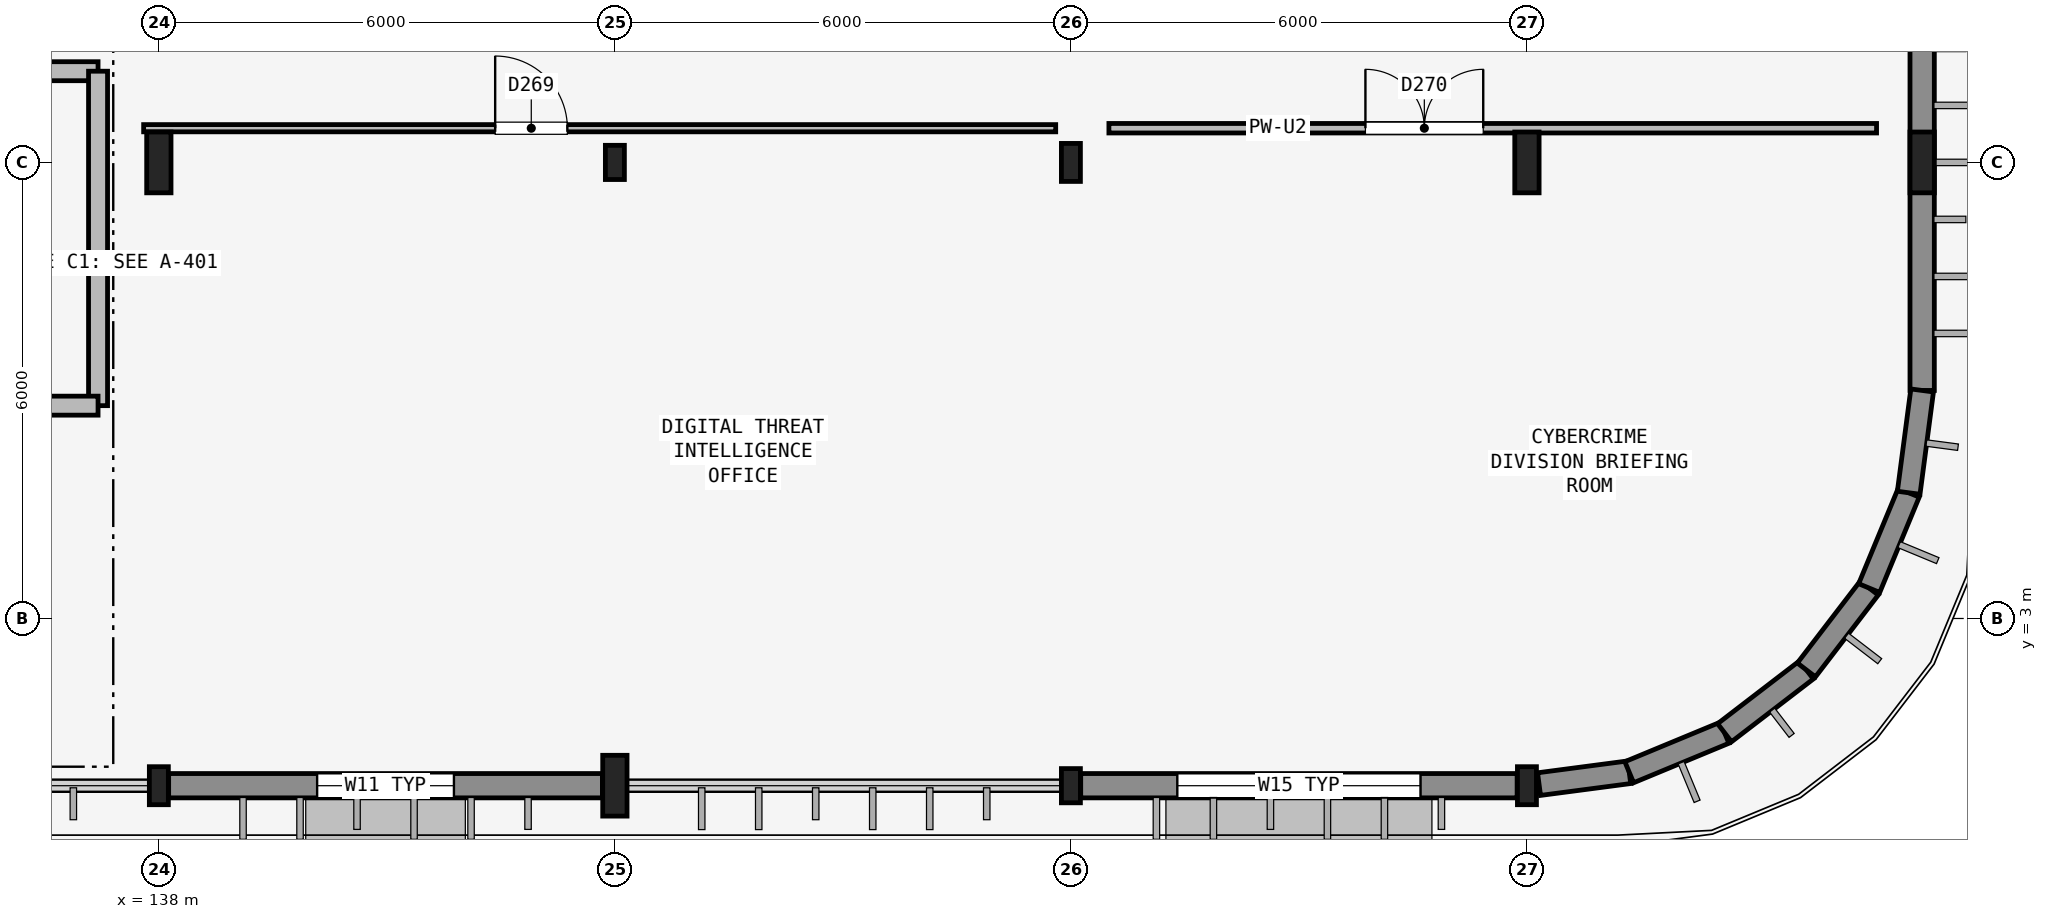
"""IFC4 building model, lengths in metres.
Left out: names, types, materials, properties, quantities, classifications, styles, units other than length and angle.
Written with IfcOpenShell. Run it as: python <this file> out.ifc"""

import sys

from ifc_helpers import new_model, si_unit, direction, frame, frame_2d, origin, origin_2d, place, context, subcontext, project, spatial, rectangle, i_section, extrude, element, fill, save


model = new_model("IFC4")
c1 = context("Model", 3, precision=1e-05, world=origin(), true_north=direction((0.0, 1.0)))
c2 = subcontext(c1, "Body", "Model", "MODEL_VIEW")
j1 = project(units=[si_unit("LENGTHUNIT", "METRE"), si_unit("PLANEANGLEUNIT", "RADIAN")], contexts=[c1])
p1 = place(None, origin())
s1 = spatial("IfcSite", under=j1, at=p1, CompositionType="ELEMENT")
p2 = place(p1, origin())
s2 = spatial("IfcBuilding", under=s1, at=p2, CompositionType="ELEMENT")
p3 = place(p2, frame((0.0, 0.0, 18.0)))
s3 = spatial("IfcBuildingStorey", under=s2, at=p3, CompositionType="ELEMENT", Elevation=18.0)
p4 = place(p3, frame((138.0, 0.8, 0.0), z_axis=(0.0, 0.0, 1.0), x_axis=(1.0, 0.0, 0.0)))
e1 = element("IfcColumn", 1, at=p4, inside=s3, PredefinedType="COLUMN", context=c2, shape_type="SweptSolid", body=[
    extrude(i_section(OverallWidth=0.25, OverallDepth=0.5, WebThickness=0.01, FlangeThickness=0.015, FilletRadius=0.015, at=origin_2d()), origin(), (0.0, 0.0, 1.0), 4.2),
])
for number, where, z_axis, x_axis in (
    (2, (138.0, 9.0, 0.0), (0.0, 0.0, 1.0), (1.0, 0.0, 0.0)),
    (3, (144.0, 0.8, 0.0), (0.0, 0.0, 1.0), (1.0, 0.0, 0.0)),
):
    element("IfcColumn", number, at=place(p3, frame(where, z_axis=z_axis, x_axis=x_axis)), inside=s3, PredefinedType="COLUMN", context=c2, shape_type="SweptSolid", body=[
        extrude(i_section(OverallWidth=0.32, OverallDepth=0.8, WebThickness=0.016, FlangeThickness=0.028, at=origin_2d()), origin(), (0.0, 0.0, 1.0), 4.2),
    ])
for number, where, z_axis, x_axis in (
    (4, (144.0, 9.0, 0.0), (0.0, 0.0, 1.0), (1.0, 0.0, 0.0)),
    (5, (150.0, 0.8, 0.0), (0.0, 0.0, 1.0), (1.0, 0.0, 0.0)),
):
    element("IfcColumn", number, at=place(p3, frame(where, z_axis=z_axis, x_axis=x_axis)), inside=s3, PredefinedType="COLUMN", context=c2, shape_type="SweptSolid", body=[
        extrude(i_section(OverallWidth=0.25, OverallDepth=0.45, WebThickness=0.011, FlangeThickness=0.014, FilletRadius=0.015, at=origin_2d()), origin(), (0.0, 0.0, 1.0), 4.2),
    ])
for number, where, z_axis, x_axis in (
    (6, (150.0, 9.0, 0.0), (0.0, 0.0, 1.0), (1.0, 0.0, 0.0)),
    (7, (156.0, 0.8, 0.0), (0.0, 0.0, 1.0), (1.0, 0.0, 0.0)),
):
    element("IfcColumn", number, at=place(p3, frame(where, z_axis=z_axis, x_axis=x_axis)), inside=s3, PredefinedType="COLUMN", context=c2, shape_type="SweptSolid", body=[
        extrude(i_section(OverallWidth=0.25, OverallDepth=0.5, WebThickness=0.01, FlangeThickness=0.015, FilletRadius=0.015, at=origin_2d()), origin(), (0.0, 0.0, 1.0), 4.2),
    ])
for number, where, z_axis, x_axis in (
    (8, (156.0, 9.0, 0.0), (0.0, 0.0, 1.0), (1.0, 0.0, 0.0)),
    (9, (161.2, 9.0, 0.0), (0.0, 0.0, 1.0), (1.0, 0.0, 0.0)),
):
    element("IfcColumn", number, at=place(p3, frame(where, z_axis=z_axis, x_axis=x_axis)), inside=s3, PredefinedType="COLUMN", context=c2, shape_type="SweptSolid", body=[
        extrude(i_section(OverallWidth=0.32, OverallDepth=0.8, WebThickness=0.016, FlangeThickness=0.028, at=origin_2d()), origin(), (0.0, 0.0, 1.0), 4.2),
    ])
p5 = place(p3, frame((138.129, 0.8, 0.0), z_axis=(0.0, 0.0, 1.0), x_axis=(1.0, 0.0, 0.0)))
e10 = element("IfcWall", 10, at=p5, inside=s3, PredefinedType="SOLIDWALL", context=c2, shape_type="SweptSolid", body=[
    extrude(rectangle(XDim=5.707, YDim=0.32, at=frame_2d((2.854, 0.0))), origin(), (0.0, 0.0, 1.0), 3.39),
])
p6 = place(p5, frame((1.954, 0.0, 0.6)))
e11 = element("IfcOpeningElement", 11, at=p6, cuts=e10, PredefinedType="OPENING", context=c2, shape_type="SweptSolid", body=[
    extrude(rectangle(XDim=1.8, YDim=2.2, at=frame_2d((0.9, 1.1))), frame((0.0, 0.17, 0.0), z_axis=(0.0, -1.0, 0.0), x_axis=(1.0, 0.0, 0.0)), (0.0, 0.0, 1.0), 0.34),
])
p7 = place(p3, frame((150.129, 0.8, 0.0), z_axis=(0.0, 0.0, 1.0), x_axis=(1.0, 0.0, 0.0)))
e12 = element("IfcWall", 12, at=p7, inside=s3, PredefinedType="SOLIDWALL", context=c2, shape_type="SweptSolid", body=[
    extrude(rectangle(XDim=5.742, YDim=0.32, at=frame_2d((2.871, 0.0))), origin(), (0.0, 0.0, 1.0), 3.39),
])
p8 = place(p7, frame((1.271, 0.0, 0.8)))
e13 = element("IfcOpeningElement", 13, at=p8, cuts=e12, PredefinedType="OPENING", context=c2, shape_type="SweptSolid", body=[
    extrude(rectangle(XDim=3.2, YDim=1.8, at=frame_2d((1.6, 0.9))), frame((0.0, 0.17, 0.0), z_axis=(0.0, -1.0, 0.0), x_axis=(1.0, 0.0, 0.0)), (0.0, 0.0, 1.0), 0.34),
])
p9 = place(p3, frame((161.2, 6.0, 0.0), z_axis=(0.0, 0.0, 1.0), x_axis=(0.0, 1.0, 0.0)))
e14 = element("IfcWall", 14, at=p9, inside=s3, PredefinedType="SOLIDWALL", context=c2, shape_type="SweptSolid", body=[
    extrude(rectangle(XDim=6.0, YDim=0.32, at=frame_2d((3.0, 0.0))), origin(), (0.0, 0.0, 1.0), 3.39),
])
p10 = place(p3, frame((156.159, 0.821, 0.0), z_axis=(0.0, 0.0, 1.0), x_axis=(0.991443879237, 0.13053365207, 0.0)))
e15 = element("IfcWall", 15, at=p10, inside=s3, PredefinedType="SOLIDWALL", context=c2, shape_type="SweptSolid", body=[
    extrude(rectangle(XDim=1.197, YDim=0.3, at=frame_2d((0.599, 0.0))), origin(), (0.0, 0.0, 1.0), 3.39),
])
for number, where, z_axis, x_axis in (
    (16, (157.346, 0.977, 0.0), (0.0, 0.0, 1.0), (0.924, 0.383, 0.0)),
    (17, (158.6, 1.497, 0.0), (0.0, 0.0, 1.0), (0.793, 0.609, 0.0)),
    (18, (159.677, 2.323, 0.0), (0.0, 0.0, 1.0), (0.609, 0.793, 0.0)),
    (19, (160.503, 3.4, 0.0), (0.0, 0.0, 1.0), (0.383, 0.924, 0.0)),
):
    element("IfcWall", number, at=place(p3, frame(where, z_axis=z_axis, x_axis=x_axis)), inside=s3, PredefinedType="SOLIDWALL", context=c2, shape_type="SweptSolid", body=[
        extrude(rectangle(XDim=1.357, YDim=0.3, at=frame_2d((0.679, 0.0))), origin(), (0.0, 0.0, 1.0), 3.895),
    ])
p11 = place(p3, frame((161.023, 4.654, 0.0), z_axis=(0.0, 0.0, 1.0), x_axis=(0.130561507967, 0.991440211328, 0.0)))
e20 = element("IfcWall", 20, at=p11, inside=s3, PredefinedType="SOLIDWALL", context=c2, shape_type="SweptSolid", body=[
    extrude(rectangle(XDim=1.358, YDim=0.3, at=frame_2d((0.679, 0.0))), origin(), (0.0, 0.0, 1.0), 3.895),
])
p12 = place(p3, frame((131.55, 10.2, 0.0), z_axis=(0.0, 0.0, 1.0), x_axis=(1.0, 0.0, 0.0)))
e21 = element("IfcWall", 21, at=p12, inside=s3, PredefinedType="PARTITIONING", context=c2, shape_type="SweptSolid", body=[
    extrude(rectangle(XDim=5.65, YDim=0.25, at=frame_2d((2.825, 0.0))), origin(), (0.0, 0.0, 1.0), 3.44),
])
p13 = place(p12, frame((2.075, 0.0, 0.0)))
e22 = element("IfcOpeningElement", 22, at=p13, cuts=e21, PredefinedType="OPENING", context=c2, shape_type="SweptSolid", body=[
    extrude(rectangle(XDim=1.5, YDim=2.15, at=frame_2d((0.75, 1.075))), frame((0.0, 0.135, 0.0), z_axis=(0.0, -1.0, 0.0), x_axis=(1.0, 0.0, 0.0)), (0.0, 0.0, 1.0), 0.27),
])
p14 = place(p3, frame((137.2, 5.8, 0.0), z_axis=(0.0, 0.0, 1.0), x_axis=(0.0, 1.0, 0.0)))
e23 = element("IfcWall", 23, at=p14, inside=s3, PredefinedType="PARTITIONING", context=c2, shape_type="SweptSolid", body=[
    extrude(rectangle(XDim=4.4, YDim=0.25, at=frame_2d((2.2, 0.0))), origin(), (0.0, 0.0, 1.0), 3.34),
])
p15 = place(p3, frame((135.6, 5.8, 0.0), z_axis=(0.0, 0.0, 1.0), x_axis=(1.0, 0.0, 0.0)))
e24 = element("IfcWall", 24, at=p15, inside=s3, PredefinedType="PARTITIONING", context=c2, shape_type="SweptSolid", body=[
    extrude(rectangle(XDim=1.6, YDim=0.25, at=frame_2d((0.8, 0.0))), origin(), (0.0, 0.0, 1.0), 3.89),
])
p16 = place(p3, frame((137.8, 9.45, 0.0), z_axis=(0.0, 0.0, 1.0), x_axis=(1.0, 0.0, 0.0)))
e25 = element("IfcWall", 25, at=p16, inside=s3, PredefinedType="PARTITIONING", context=c2, shape_type="SweptSolid", body=[
    extrude(rectangle(XDim=12.0, YDim=0.095, at=frame_2d((6.0, 0.0))), origin(), (0.0, 0.0, 1.0), 3.44),
])
p17 = place(p16, frame((4.625, 0.0, 0.0)))
e26 = element("IfcOpeningElement", 26, at=p17, cuts=e25, PredefinedType="OPENING", context=c2, shape_type="SweptSolid", body=[
    extrude(rectangle(XDim=0.95, YDim=2.15, at=frame_2d((0.475, 1.075))), frame((0.0, 0.057, 0.0), z_axis=(0.0, -1.0, 0.0), x_axis=(1.0, 0.0, 0.0)), (0.0, 0.0, 1.0), 0.115),
])
p18 = place(p3, frame((150.5, 9.45, 0.0), z_axis=(0.0, 0.0, 1.0), x_axis=(1.0, 0.0, 0.0)))
e27 = element("IfcWall", 27, at=p18, inside=s3, PredefinedType="PARTITIONING", context=c2, shape_type="SweptSolid", body=[
    extrude(rectangle(XDim=10.1, YDim=0.125, at=frame_2d((5.05, 0.0))), origin(), (0.0, 0.0, 1.0), 3.44),
])
p19 = place(p18, frame((3.375, 0.0, 0.0)))
e28 = element("IfcOpeningElement", 28, at=p19, cuts=e27, PredefinedType="OPENING", context=c2, shape_type="SweptSolid", body=[
    extrude(rectangle(XDim=1.55, YDim=2.2, at=frame_2d((0.775, 1.1))), frame((0.0, 0.073, 0.0), z_axis=(0.0, -1.0, 0.0), x_axis=(1.0, 0.0, 0.0)), (0.0, 0.0, 1.0), 0.145),
])
p20 = place(p6, origin())
e29 = element("IfcWindow", 29, at=p20, inside=s3, PartitioningType="SINGLE_PANEL", PredefinedType="WINDOW", context=c2, shape_type="SweptSolid", body=[
    extrude(rectangle(XDim=1.8, YDim=2.2, at=frame_2d((0.9, 1.1))), frame((0.0, 0.03, 0.0), z_axis=(0.0, -1.0, 0.0), x_axis=(1.0, 0.0, 0.0)), (0.0, 0.0, 1.0), 0.06),
])
fill(e11, e29)
p21 = place(p8, origin())
e30 = element("IfcWindow", 30, at=p21, inside=s3, PartitioningType="SINGLE_PANEL", PredefinedType="WINDOW", context=c2, shape_type="SweptSolid", body=[
    extrude(rectangle(XDim=3.2, YDim=1.8, at=frame_2d((1.6, 0.9))), frame((0.0, 0.03, 0.0), z_axis=(0.0, -1.0, 0.0), x_axis=(1.0, 0.0, 0.0)), (0.0, 0.0, 1.0), 0.06),
])
fill(e13, e30)
p22 = place(p17, origin())
e31 = element("IfcDoor", 31, at=p22, inside=s3, OperationType="SINGLE_SWING_LEFT", PredefinedType="DOOR", context=c2, shape_type="SweptSolid", body=[
    extrude(rectangle(XDim=0.95, YDim=2.15, at=frame_2d((0.475, 1.075))), frame((0.0, 0.025, 0.0), z_axis=(0.0, -1.0, 0.0), x_axis=(1.0, 0.0, 0.0)), (0.0, 0.0, 1.0), 0.05),
])
fill(e26, e31)
p23 = place(p19, origin())
e32 = element("IfcDoor", 32, at=p23, inside=s3, OperationType="DOUBLE_DOOR_SINGLE_SWING", PredefinedType="DOOR", context=c2, shape_type="SweptSolid", body=[
    extrude(rectangle(XDim=1.55, YDim=2.2, at=frame_2d((0.775, 1.1))), frame((0.0, 0.025, 0.0), z_axis=(0.0, -1.0, 0.0), x_axis=(1.0, 0.0, 0.0)), (0.0, 0.0, 1.0), 0.05),
])
fill(e28, e32)
save(model, sys.argv[1])
